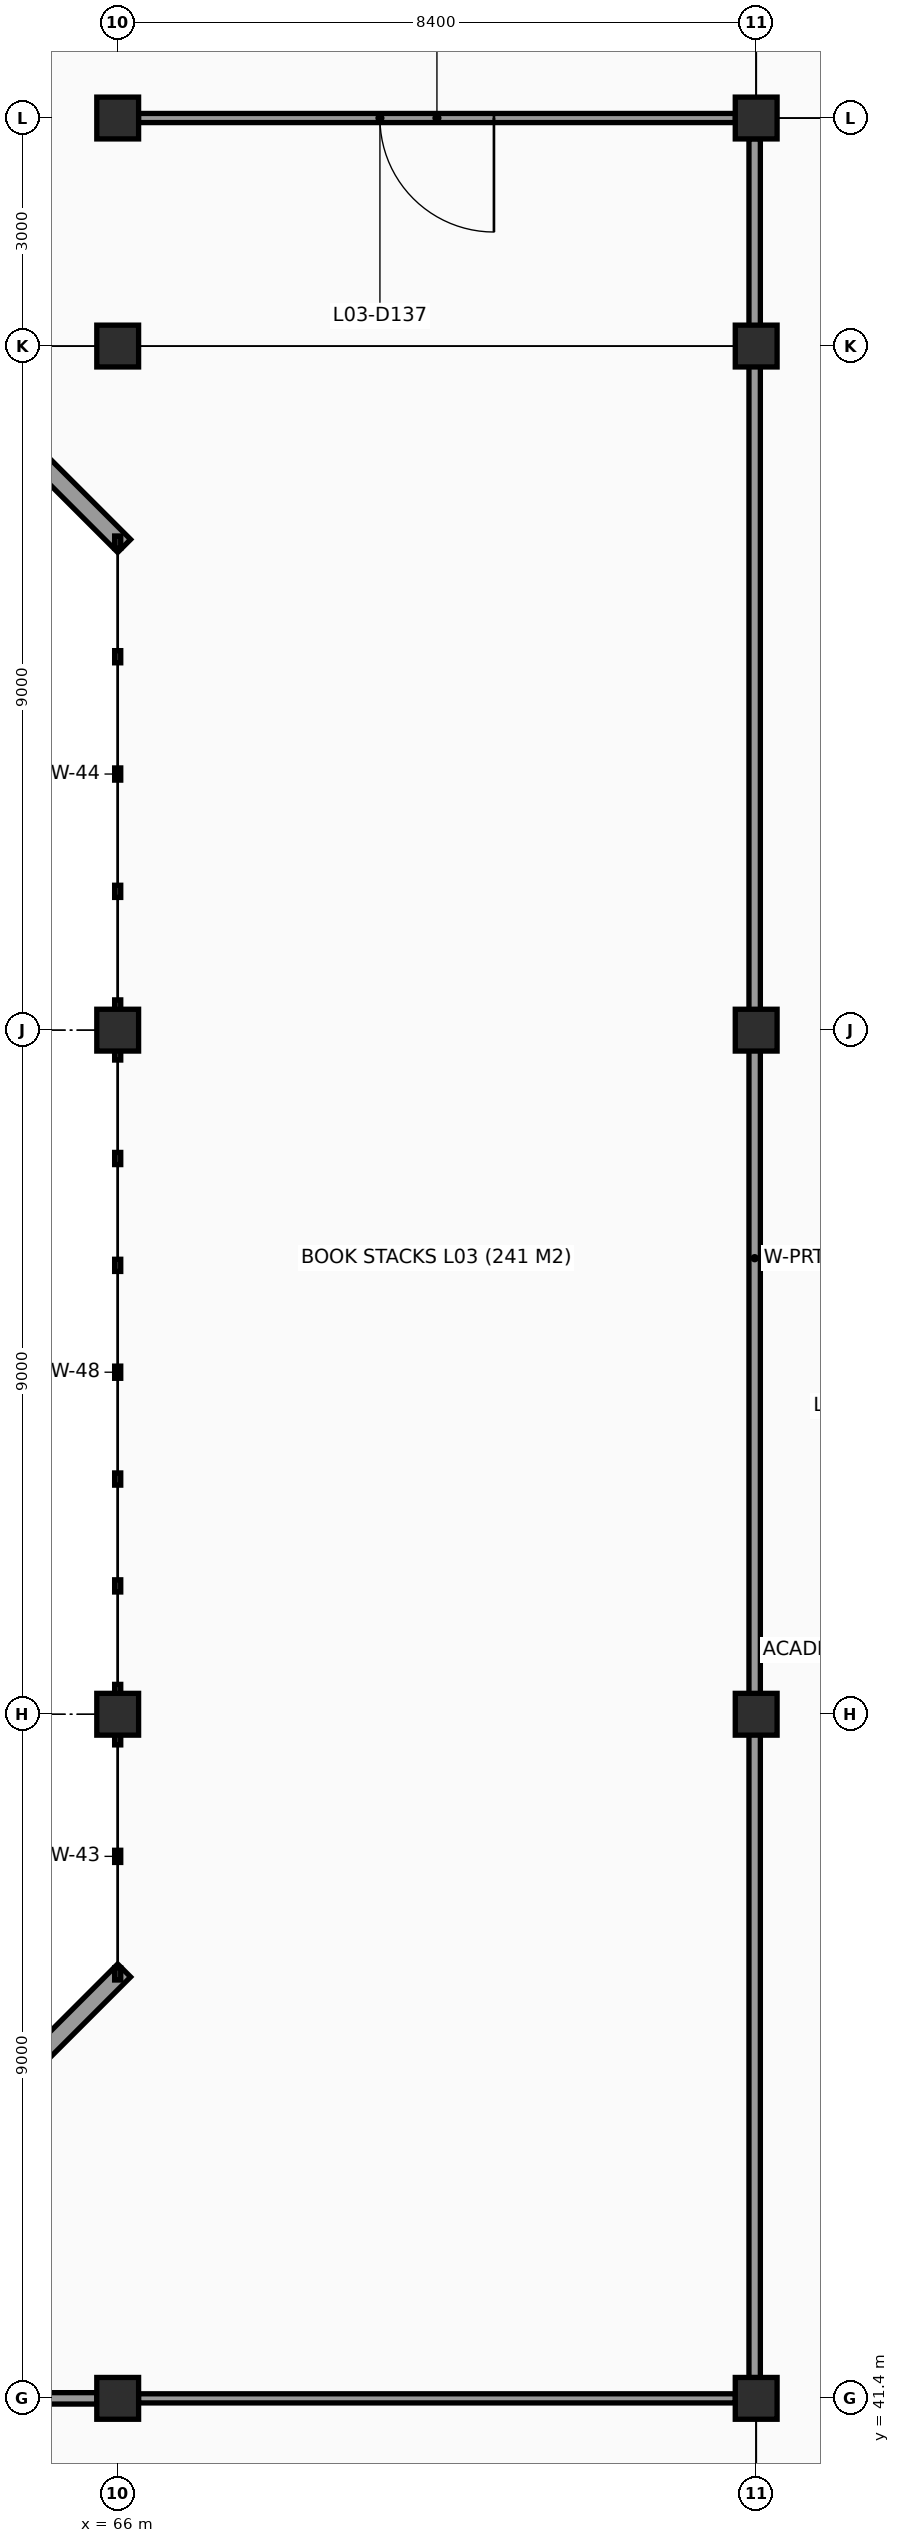
"""IFC4 building model, lengths in metres.
Left out: names, types, materials, properties, quantities, classifications, styles, units other than length and angle.
Written with IfcOpenShell. Run it as: python <this file> out.ifc"""

import sys

from ifc_helpers import new_model, si_unit, direction, frame, frame_2d, origin, origin_2d, place, context, subcontext, project, spatial, rectangle, extrude, element, fill, save


model = new_model("IFC4")
c1 = context("Model", 3, precision=1e-05, world=origin(), true_north=direction((0.0, 1.0)))
c2 = subcontext(c1, "Body", "Model", "MODEL_VIEW")
j1 = project(units=[si_unit("LENGTHUNIT", "METRE"), si_unit("PLANEANGLEUNIT", "RADIAN")], contexts=[c1])
p1 = place(None, origin())
s1 = spatial("IfcSite", under=j1, at=p1, CompositionType="ELEMENT")
p2 = place(p1, origin())
s2 = spatial("IfcBuilding", under=s1, at=p2, CompositionType="ELEMENT")
p3 = place(p2, frame((0.0, 0.0, 11.4)))
s3 = spatial("IfcBuildingStorey", under=s2, at=p3, CompositionType="ELEMENT", Elevation=11.4)
for number, where, z_axis, x_axis in (
    (1, (66.0, 41.4, 0.0), (0.0, 0.0, 1.0), (1.0, 0.0, 0.0)),
    (2, (66.0, 50.4, 0.0), (0.0, 0.0, 1.0), (1.0, 0.0, 0.0)),
    (3, (66.0, 59.4, 0.0), (0.0, 0.0, 1.0), (1.0, 0.0, 0.0)),
    (4, (66.0, 68.4, 0.0), (0.0, 0.0, 1.0), (1.0, 0.0, 0.0)),
    (5, (66.0, 71.4, 0.0), (0.0, 0.0, 1.0), (1.0, 0.0, 0.0)),
    (6, (74.4, 41.4, 0.0), (0.0, 0.0, 1.0), (1.0, 0.0, 0.0)),
    (7, (74.4, 50.4, 0.0), (0.0, 0.0, 1.0), (1.0, 0.0, 0.0)),
    (8, (74.4, 59.4, 0.0), (0.0, 0.0, 1.0), (1.0, 0.0, 0.0)),
    (9, (74.4, 68.4, 0.0), (0.0, 0.0, 1.0), (1.0, 0.0, 0.0)),
    (10, (74.4, 71.4, 0.0), (0.0, 0.0, 1.0), (1.0, 0.0, 0.0)),
):
    element("IfcColumn", number, at=place(p3, frame(where, z_axis=z_axis, x_axis=x_axis)), inside=s3, PredefinedType="COLUMN", context=c2, shape_type="SweptSolid", body=[
        extrude(rectangle(XDim=0.55, YDim=0.55, at=origin_2d()), origin(), (0.0, 0.0, 1.0), 3.6),
    ])
p4 = place(p3, frame((60.371, 41.315, 0.0), z_axis=(0.0, 0.0, 1.0), x_axis=(0.707121887885, 0.707091674165, 0.0)))
e11 = element("IfcWall", 11, at=p4, inside=s3, PredefinedType="SOLIDWALL", context=c2, shape_type="SweptSolid", body=[
    extrude(rectangle(XDim=8.081, YDim=0.24, at=frame_2d((4.04, 0.0))), origin(), (0.0, 0.0, 1.0), 2.59),
])
p5 = place(p3, frame((66.085, 65.771, 0.0), z_axis=(0.0, 0.0, 1.0), x_axis=(-0.707106781187, 0.707106781187, 0.0)))
e12 = element("IfcWall", 12, at=p5, inside=s3, PredefinedType="SOLIDWALL", context=c2, shape_type="SweptSolid", body=[
    extrude(rectangle(XDim=3.838, YDim=0.24, at=frame_2d((1.919, 0.0))), origin(), (0.0, 0.0, 1.0), 2.64),
])
p6 = place(p3, frame((60.908, 41.4, 0.0), z_axis=(0.0, 0.0, 1.0), x_axis=(1.0, 0.0, 0.0)))
e13 = element("IfcWall", 13, at=p6, inside=s3, PredefinedType="PARTITIONING", context=c2, shape_type="SweptSolid", body=[
    extrude(rectangle(XDim=4.819, YDim=0.15, at=frame_2d((2.409, 0.0))), origin(), (0.0, 0.0, 1.0), 2.59),
])
p7 = place(p3, frame((66.273, 71.4, 0.0), z_axis=(0.0, 0.0, 1.0), x_axis=(1.0, 0.0, 0.0)))
e14 = element("IfcWall", 14, at=p7, inside=s3, PredefinedType="PARTITIONING", context=c2, shape_type="SweptSolid", body=[
    extrude(rectangle(XDim=7.854, YDim=0.12, at=frame_2d((3.927, 0.0))), origin(), (0.0, 0.0, 1.0), 2.95),
])
p8 = place(p7, frame((3.177, 0.0, 0.0)))
e15 = element("IfcOpeningElement", 15, at=p8, cuts=e14, PredefinedType="OPENING", context=c2, shape_type="SweptSolid", body=[
    extrude(rectangle(XDim=1.5, YDim=2.2, at=frame_2d((0.75, 1.1))), frame((0.0, 0.07, 0.0), z_axis=(0.0, -1.0, 0.0), x_axis=(1.0, 0.0, 0.0)), (0.0, 0.0, 1.0), 0.14),
])
p9 = place(p3, frame((74.38, 71.127, 0.0), z_axis=(0.0, 0.0, 1.0), x_axis=(0.0, -1.0, 0.0)))
e16 = element("IfcWall", 16, at=p9, inside=s3, PredefinedType="PARTITIONING", context=c2, shape_type="SweptSolid", body=[
    extrude(rectangle(XDim=29.454, YDim=0.15, at=frame_2d((14.727, 0.0))), origin(), (0.0, 0.0, 1.0), 2.73),
])
p10 = place(p3, frame((74.127, 41.4, 0.0), z_axis=(0.0, 0.0, 1.0), x_axis=(-1.0, 0.0, 0.0)))
e17 = element("IfcWall", 17, at=p10, inside=s3, PredefinedType="PARTITIONING", context=c2, shape_type="SweptSolid", body=[
    extrude(rectangle(XDim=7.854, YDim=0.12, at=frame_2d((3.927, 0.0))), origin(), (0.0, 0.0, 1.0), 2.53),
])
p11 = place(p8, origin())
e18 = element("IfcDoor", 18, at=p11, inside=s3, OperationType="DOUBLE_DOOR_SINGLE_SWING", PredefinedType="DOOR", context=c2, shape_type="SweptSolid", body=[
    extrude(rectangle(XDim=1.5, YDim=2.2, at=frame_2d((0.75, 1.1))), frame((0.0, 0.025, 0.0), z_axis=(0.0, -1.0, 0.0), x_axis=(1.0, 0.0, 0.0)), (0.0, 0.0, 1.0), 0.05),
])
fill(e15, e18)
save(model, sys.argv[1])
